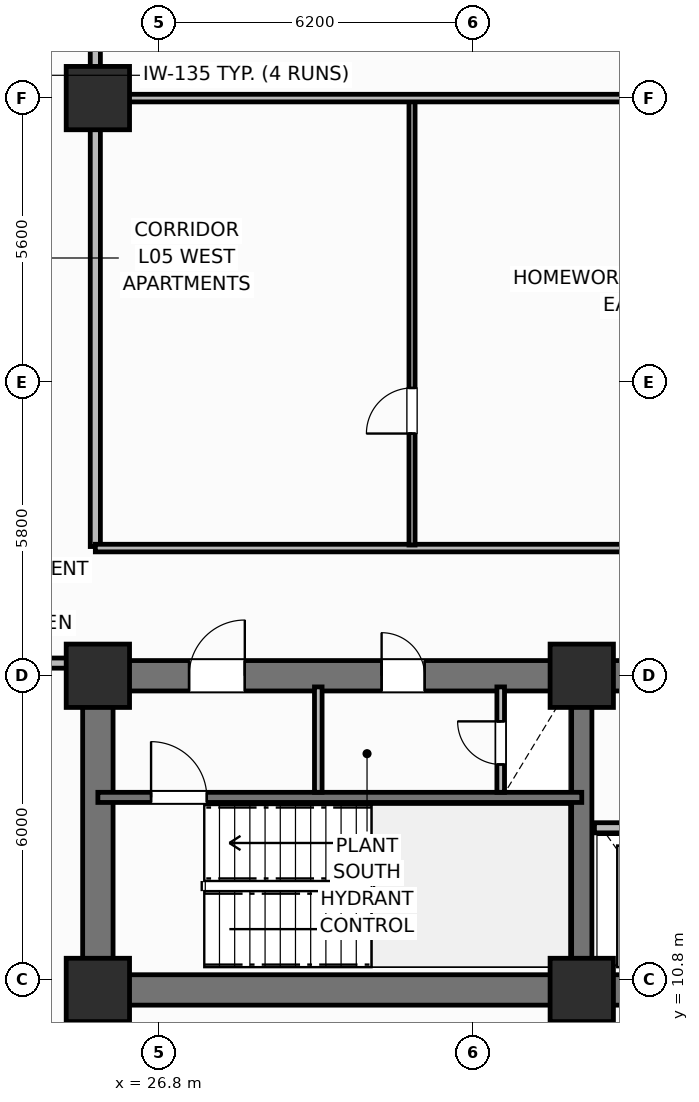
"""IFC4 building model, lengths in metres.
Left out: names, types, materials, properties, quantities, classifications, styles, units other than length and angle.
Written with IfcOpenShell. Run it as: python <this file> out.ifc"""

import sys

from ifc_helpers import new_model, si_unit, direction, frame, frame_2d, origin, origin_2d, place, context, subcontext, project, spatial, rectangle, extrude, element, fill, save


model = new_model("IFC4")
c1 = context("Model", 3, precision=1e-05, world=origin(), true_north=direction((0.0, 1.0)))
c2 = subcontext(c1, "Body", "Model", "MODEL_VIEW")
j1 = project(units=[si_unit("LENGTHUNIT", "METRE"), si_unit("PLANEANGLEUNIT", "RADIAN")], contexts=[c1])
p1 = place(None, origin())
s1 = spatial("IfcSite", under=j1, at=p1, CompositionType="ELEMENT")
p2 = place(p1, origin())
s2 = spatial("IfcBuilding", under=s1, at=p2, CompositionType="ELEMENT")
p3 = place(p2, frame((0.0, 0.0, 24.6)))
s3 = spatial("IfcBuildingStorey", under=s2, at=p3, CompositionType="ELEMENT", Elevation=24.6)
p4 = place(p3, frame((52.8, 10.6, 0.0), z_axis=(0.0, 0.0, 1.0), x_axis=(-1.0, 0.0, 0.0)))
e1 = element("IfcWall", 1, at=p4, inside=s3, PredefinedType="SHEAR", context=c2, shape_type="SweptSolid", body=[
    extrude(rectangle(XDim=27.2, YDim=0.6, at=frame_2d((13.6, 0.0))), origin(), (0.0, 0.0, 1.0), 4.2),
])
p5 = place(p3, frame((25.6, 10.9, 0.0), z_axis=(0.0, 0.0, 1.0), x_axis=(0.0, 1.0, 0.0)))
e2 = element("IfcWall", 2, at=p5, inside=s3, PredefinedType="SHEAR", context=c2, shape_type="SweptSolid", body=[
    extrude(rectangle(XDim=5.6, YDim=0.6, at=frame_2d((2.8, 0.0))), origin(), (0.0, 0.0, 1.0), 4.2),
])
p6 = place(p3, frame((25.6, 16.8, 0.0), z_axis=(0.0, 0.0, 1.0), x_axis=(1.0, 0.0, 0.0)))
e3 = element("IfcWall", 3, at=p6, inside=s3, PredefinedType="SHEAR", context=c2, shape_type="SweptSolid", body=[
    extrude(rectangle(XDim=27.2, YDim=0.6, at=frame_2d((13.6, 0.0))), origin(), (0.0, 0.0, 1.0), 4.2),
])
p7 = place(p6, frame((1.8, 0.0, 0.0)))
e4 = element("IfcOpeningElement", 4, at=p7, cuts=e3, PredefinedType="OPENING", context=c2, shape_type="SweptSolid", body=[
    extrude(rectangle(XDim=1.1, YDim=2.15, at=frame_2d((0.55, 1.075))), frame((0.0, 0.31, 0.0), z_axis=(0.0, -1.0, 0.0), x_axis=(1.0, 0.0, 0.0)), (0.0, 0.0, 1.0), 0.62),
])
p8 = place(p6, frame((5.6, 0.0, 0.0)))
e5 = element("IfcOpeningElement", 5, at=p8, cuts=e3, PredefinedType="OPENING", context=c2, shape_type="SweptSolid", body=[
    extrude(rectangle(XDim=0.85, YDim=2.1, at=frame_2d((0.425, 1.05))), frame((0.0, 0.31, 0.0), z_axis=(0.0, -1.0, 0.0), x_axis=(1.0, 0.0, 0.0)), (0.0, 0.0, 1.0), 0.62),
])
p9 = place(p6, frame((13.0, 0.0, 0.0)))
e6 = element("IfcOpeningElement", 6, at=p9, cuts=e3, PredefinedType="OPENING", context=c2, shape_type="SweptSolid", body=[
    extrude(rectangle(XDim=1.2, YDim=2.15, at=frame_2d((0.6, 1.075))), frame((0.0, 0.31, 0.0), z_axis=(0.0, -1.0, 0.0), x_axis=(1.0, 0.0, 0.0)), (0.0, 0.0, 1.0), 0.62),
])
p10 = place(p6, frame((20.4, 0.0, 0.0)))
e7 = element("IfcOpeningElement", 7, at=p10, cuts=e3, PredefinedType="OPENING", context=c2, shape_type="SweptSolid", body=[
    extrude(rectangle(XDim=1.3, YDim=2.2, at=frame_2d((0.65, 1.1))), frame((0.0, 0.31, 0.0), z_axis=(0.0, -1.0, 0.0), x_axis=(1.0, 0.0, 0.0)), (0.0, 0.0, 1.0), 0.62),
])
p11 = place(p6, frame((24.65, 0.0, 0.0)))
e8 = element("IfcOpeningElement", 8, at=p11, cuts=e3, PredefinedType="OPENING", context=c2, shape_type="SweptSolid", body=[
    extrude(rectangle(XDim=0.85, YDim=2.1, at=frame_2d((0.425, 1.05))), frame((0.0, 0.31, 0.0), z_axis=(0.0, -1.0, 0.0), x_axis=(1.0, 0.0, 0.0)), (0.0, 0.0, 1.0), 0.62),
])
p12 = place(p3, frame((35.15, 10.9, 0.0), z_axis=(0.0, 0.0, 1.0), x_axis=(0.0, 1.0, 0.0)))
e9 = element("IfcWall", 9, at=p12, inside=s3, PredefinedType="SHEAR", context=c2, shape_type="SweptSolid", body=[
    extrude(rectangle(XDim=5.6, YDim=0.4, at=frame_2d((2.8, 0.0))), origin(), (0.0, 0.0, 1.0), 4.2),
])
for number, where, z_axis, x_axis in (
    (10, (25.6, 10.6, 0.0), (0.0, 0.0, 1.0), (1.0, 0.0, 0.0)),
    (11, (25.6, 16.8, 0.0), (0.0, 0.0, 1.0), (1.0, 0.0, 0.0)),
    (12, (35.15, 10.6, 0.0), (0.0, 0.0, 1.0), (1.0, 0.0, 0.0)),
    (13, (35.15, 16.8, 0.0), (0.0, 0.0, 1.0), (1.0, 0.0, 0.0)),
    (14, (25.6, 28.2, 0.0), (0.0, 0.0, 1.0), (1.0, 0.0, 0.0)),
):
    element("IfcColumn", number, at=place(p3, frame(where, z_axis=z_axis, x_axis=x_axis)), inside=s3, PredefinedType="COLUMN", context=c2, shape_type="SweptSolid", body=[
        extrude(rectangle(XDim=1.25, YDim=1.25, at=origin_2d()), origin(), (0.0, 0.0, 1.0), 4.2),
    ])
p13 = place(p3, frame((25.6, 14.4, 0.0), z_axis=(0.0, 0.0, 1.0), x_axis=(1.0, 0.0, 0.0)))
e15 = element("IfcWall", 15, at=p13, inside=s3, PredefinedType="SHEAR", context=c2, shape_type="SweptSolid", body=[
    extrude(rectangle(XDim=9.55, YDim=0.2, at=frame_2d((4.775, 0.0))), origin(), (0.0, 0.0, 1.0), 4.2),
])
p14 = place(p13, frame((1.05, 0.0, 0.0)))
e16 = element("IfcOpeningElement", 16, at=p14, cuts=e15, PredefinedType="OPENING", context=c2, shape_type="SweptSolid", body=[
    extrude(rectangle(XDim=1.1, YDim=2.15, at=frame_2d((0.55, 1.075))), frame((0.0, 0.11, 0.0), z_axis=(0.0, -1.0, 0.0), x_axis=(1.0, 0.0, 0.0)), (0.0, 0.0, 1.0), 0.22),
])
p15 = place(p3, frame((29.95, 14.5, 0.0), z_axis=(0.0, 0.0, 1.0), x_axis=(0.0, 1.0, 0.0)))
e17 = element("IfcWall", 17, at=p15, inside=s3, PredefinedType="PARTITIONING", context=c2, shape_type="SweptSolid", body=[
    extrude(rectangle(XDim=2.08, YDim=0.15, at=frame_2d((1.04, 0.0))), origin(), (0.0, 0.0, 1.0), 3.03),
])
p16 = place(p3, frame((33.55, 14.5, 0.0), z_axis=(0.0, 0.0, 1.0), x_axis=(0.0, 1.0, 0.0)))
e18 = element("IfcWall", 18, at=p16, inside=s3, PredefinedType="PARTITIONING", context=c2, shape_type="SweptSolid", body=[
    extrude(rectangle(XDim=2.08, YDim=0.15, at=frame_2d((1.04, 0.0))), origin(), (0.0, 0.0, 1.0), 3.03),
])
p17 = place(p16, frame((0.55, 0.0, 0.0)))
e19 = element("IfcOpeningElement", 19, at=p17, cuts=e18, PredefinedType="OPENING", context=c2, shape_type="SweptSolid", body=[
    extrude(rectangle(XDim=0.85, YDim=2.05, at=frame_2d((0.425, 1.025))), frame((0.0, 0.085, 0.0), z_axis=(0.0, -1.0, 0.0), x_axis=(1.0, 0.0, 0.0)), (0.0, 0.0, 1.0), 0.17),
])
p18 = place(p3, frame((35.4, 13.8, 0.0), z_axis=(0.0, 0.0, 1.0), x_axis=(1.0, 0.0, 0.0)))
e20 = element("IfcWall", 20, at=p18, inside=s3, PredefinedType="PARTITIONING", context=c2, shape_type="SweptSolid", body=[
    extrude(rectangle(XDim=7.6, YDim=0.2, at=frame_2d((3.8, 0.0))), origin(), (0.0, 0.0, 1.0), 2.8),
])
p19 = place(p18, frame((0.7, 0.0, 0.0)))
e21 = element("IfcOpeningElement", 21, at=p19, cuts=e20, PredefinedType="OPENING", context=c2, shape_type="SweptSolid", body=[
    extrude(rectangle(XDim=1.1, YDim=2.15, at=frame_2d((0.55, 1.075))), frame((0.0, 0.11, 0.0), z_axis=(0.0, -1.0, 0.0), x_axis=(1.0, 0.0, 0.0)), (0.0, 0.0, 1.0), 0.22),
])
p20 = place(p18, frame((3.35, 0.0, 0.0)))
e22 = element("IfcOpeningElement", 22, at=p20, cuts=e20, PredefinedType="OPENING", context=c2, shape_type="SweptSolid", body=[
    extrude(rectangle(XDim=1.2, YDim=2.15, at=frame_2d((0.6, 1.075))), frame((0.0, 0.11, 0.0), z_axis=(0.0, -1.0, 0.0), x_axis=(1.0, 0.0, 0.0)), (0.0, 0.0, 1.0), 0.22),
])
p21 = place(p3, frame((25.55, 19.35, 0.0), z_axis=(0.0, 0.0, 1.0), x_axis=(0.0, 1.0, 0.0)))
e23 = element("IfcWall", 23, at=p21, inside=s3, PredefinedType="PARTITIONING", context=c2, shape_type="SweptSolid", body=[
    extrude(rectangle(XDim=18.42, YDim=0.2, at=frame_2d((9.21, 0.0))), origin(), (0.0, 0.0, 1.0), 3.03),
])
p22 = place(p3, frame((14.57, 17.05, 0.0), z_axis=(0.0, 0.0, 1.0), x_axis=(1.0, 0.0, 0.0)))
e24 = element("IfcWall", 24, at=p22, inside=s3, PredefinedType="PARTITIONING", context=c2, shape_type="SweptSolid", body=[
    extrude(rectangle(XDim=10.73, YDim=0.2, at=frame_2d((5.365, 0.0))), origin(), (0.0, 0.0, 1.0), 3.03),
])
p23 = place(p3, frame((25.55, 19.32, 0.0), z_axis=(0.0, 0.0, 1.0), x_axis=(1.0, 0.0, 0.0)))
e25 = element("IfcWall", 25, at=p23, inside=s3, PredefinedType="PARTITIONING", context=c2, shape_type="SweptSolid", body=[
    extrude(rectangle(XDim=14.9, YDim=0.15, at=frame_2d((7.45, 0.0))), origin(), (0.0, 0.0, 1.0), 3.03),
])
p24 = place(p3, frame((31.8, 19.38, 0.0), z_axis=(0.0, 0.0, 1.0), x_axis=(0.0, 1.0, 0.0)))
e26 = element("IfcWall", 26, at=p24, inside=s3, PredefinedType="PARTITIONING", context=c2, shape_type="SweptSolid", body=[
    extrude(rectangle(XDim=8.77, YDim=0.12, at=frame_2d((4.385, 0.0))), origin(), (0.0, 0.0, 1.0), 3.03),
])
p25 = place(p24, frame((2.2, 0.0, 0.0)))
e27 = element("IfcOpeningElement", 27, at=p25, cuts=e26, PredefinedType="OPENING", context=c2, shape_type="SweptSolid", body=[
    extrude(rectangle(XDim=0.9, YDim=2.1, at=frame_2d((0.45, 1.05))), frame((0.0, 0.07, 0.0), z_axis=(0.0, -1.0, 0.0), x_axis=(1.0, 0.0, 0.0)), (0.0, 0.0, 1.0), 0.14),
])
p26 = place(p3, frame((25.6, 28.2, 0.0), z_axis=(0.0, 0.0, 1.0), x_axis=(1.0, 0.0, 0.0)))
e28 = element("IfcWall", 28, at=p26, inside=s3, PredefinedType="PARTITIONING", context=c2, shape_type="SweptSolid", body=[
    extrude(rectangle(XDim=14.87, YDim=0.15, at=frame_2d((7.435, 0.0))), origin(), (0.0, 0.0, 1.0), 3.03),
])
p27 = place(p14, origin())
e29 = element("IfcDoor", 29, at=p27, inside=s3, OperationType="SINGLE_SWING_LEFT", PredefinedType="DOOR", context=c2, shape_type="SweptSolid", body=[
    extrude(rectangle(XDim=1.1, YDim=2.15, at=frame_2d((0.55, 1.075))), frame((0.0, 0.025, 0.0), z_axis=(0.0, -1.0, 0.0), x_axis=(1.0, 0.0, 0.0)), (0.0, 0.0, 1.0), 0.05),
])
fill(e16, e29)
p28 = place(p17, origin())
e30 = element("IfcDoor", 30, at=p28, inside=s3, OperationType="SINGLE_SWING_RIGHT", PredefinedType="TRAPDOOR", context=c2, shape_type="SweptSolid", body=[
    extrude(rectangle(XDim=0.85, YDim=2.05, at=frame_2d((0.425, 1.025))), frame((0.0, 0.025, 0.0), z_axis=(0.0, -1.0, 0.0), x_axis=(1.0, 0.0, 0.0)), (0.0, 0.0, 1.0), 0.05),
])
fill(e19, e30)
p29 = place(p25, origin())
e31 = element("IfcDoor", 31, at=p29, inside=s3, OperationType="SINGLE_SWING_LEFT", PredefinedType="DOOR", context=c2, shape_type="SweptSolid", body=[
    extrude(rectangle(XDim=0.9, YDim=2.1, at=frame_2d((0.45, 1.05))), frame((0.0, 0.025, 0.0), z_axis=(0.0, -1.0, 0.0), x_axis=(1.0, 0.0, 0.0)), (0.0, 0.0, 1.0), 0.05),
])
fill(e27, e31)
p30 = place(p7, origin())
e32 = element("IfcDoor", 32, at=p30, inside=s3, OperationType="SINGLE_SWING_RIGHT", PredefinedType="DOOR", context=c2, shape_type="SweptSolid", body=[
    extrude(rectangle(XDim=1.1, YDim=2.15, at=frame_2d((0.55, 1.075))), frame((0.0, 0.025, 0.0), z_axis=(0.0, -1.0, 0.0), x_axis=(1.0, 0.0, 0.0)), (0.0, 0.0, 1.0), 0.05),
])
fill(e4, e32)
p31 = place(p8, origin())
e33 = element("IfcDoor", 33, at=p31, inside=s3, OperationType="SINGLE_SWING_LEFT", PredefinedType="DOOR", context=c2, shape_type="SweptSolid", body=[
    extrude(rectangle(XDim=0.85, YDim=2.1, at=frame_2d((0.425, 1.05))), frame((0.0, 0.025, 0.0), z_axis=(0.0, -1.0, 0.0), x_axis=(1.0, 0.0, 0.0)), (0.0, 0.0, 1.0), 0.05),
])
fill(e5, e33)
save(model, sys.argv[1])
